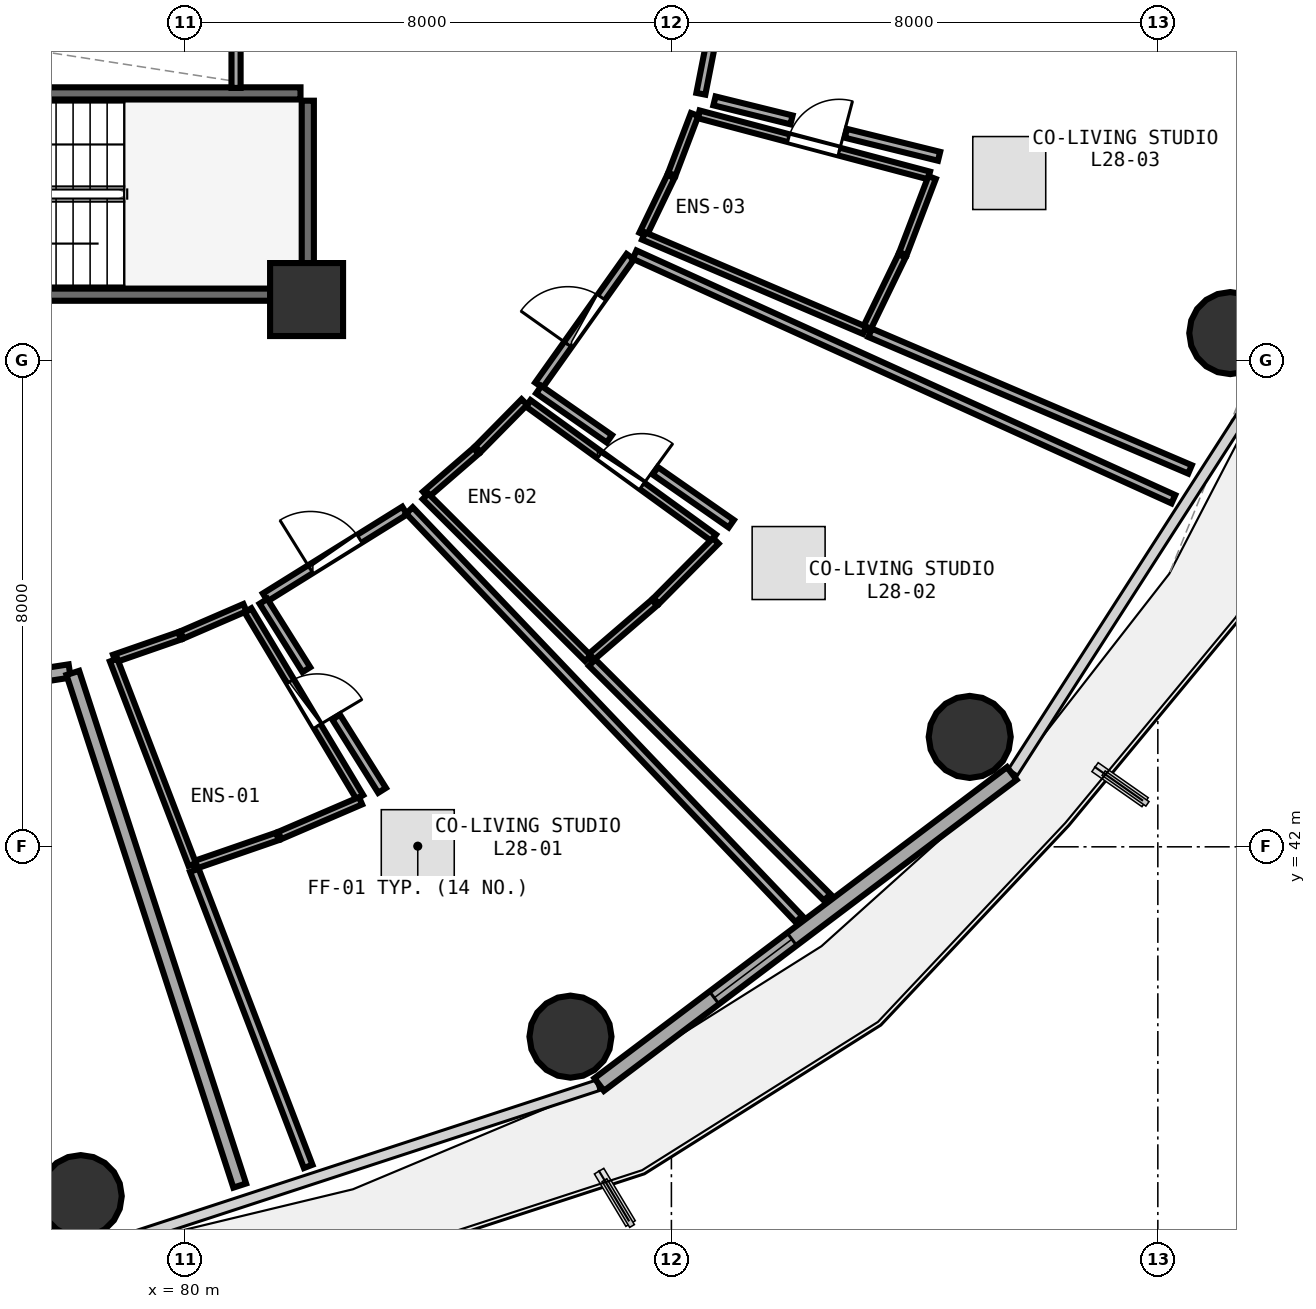
"""IFC4 building model, lengths in metres.
Left out: names, types, materials, properties, quantities, classifications, styles, units other than length and angle.
Written with IfcOpenShell. Run it as: python <this file> out.ifc"""

import sys

from ifc_helpers import new_model, si_unit, direction, frame, frame_2d, origin, origin_2d, place, context, subcontext, project, spatial, rectangle, circle, extrude, element, fill, save


model = new_model("IFC4")
c1 = context("Model", 3, precision=1e-05, world=origin(), true_north=direction((0.0, 1.0)))
c2 = subcontext(c1, "Body", "Model", "MODEL_VIEW")
j1 = project(units=[si_unit("LENGTHUNIT", "METRE"), si_unit("PLANEANGLEUNIT", "RADIAN")], contexts=[c1])
p1 = place(None, origin())
s1 = spatial("IfcSite", under=j1, at=p1, CompositionType="ELEMENT")
p2 = place(p1, origin())
s2 = spatial("IfcBuilding", under=s1, at=p2, CompositionType="ELEMENT")
p3 = place(p2, frame((0.0, 0.0, 110.1)))
s3 = spatial("IfcBuildingStorey", under=s2, at=p3, CompositionType="ELEMENT", Elevation=110.1)
p4 = place(p3, frame((82.0, 51.0, 0.0), z_axis=(0.0, 0.0, 1.0), x_axis=(1.0, 0.0, 0.0)))
e1 = element("IfcColumn", 1, at=p4, inside=s3, PredefinedType="PILASTER", context=c2, shape_type="SweptSolid", body=[
    extrude(rectangle(XDim=1.2, YDim=1.2, at=origin_2d()), origin(), (0.0, 0.0, 1.0), 3.75),
])
for number, where, z_axis, x_axis in (
    (2, (78.286, 36.255, 0.0), (0.0, 0.0, 1.0), (1.0, 0.0, 0.0)),
    (3, (86.34, 38.878, 0.0), (0.0, 0.0, 1.0), (1.0, 0.0, 0.0)),
    (4, (92.906, 43.807, 0.0), (0.0, 0.0, 1.0), (1.0, 0.0, 0.0)),
    (5, (97.192, 50.448, 0.0), (0.0, 0.0, 1.0), (1.0, 0.0, 0.0)),
):
    element("IfcColumn", number, at=place(p3, frame(where, z_axis=z_axis, x_axis=x_axis)), inside=s3, PredefinedType="COLUMN", context=c2, shape_type="SweptSolid", body=[
        extrude(circle(Radius=0.675, at=origin_2d()), origin(), (0.0, 0.0, 1.0), 3.75),
    ])
p5 = place(p3, frame((86.812, 38.09, 0.0), z_axis=(0.0, 0.0, 1.0), x_axis=(0.798501507879, 0.601992808857, 0.0)))
e6 = element("IfcWall", 6, at=p5, inside=s3, PredefinedType="SOLIDWALL", context=c2, shape_type="SweptSolid", body=[
    extrude(rectangle(XDim=8.499, YDim=0.26, at=frame_2d((4.25, 0.0))), origin(), (0.0, 0.0, 1.0), 3.475),
])
p6 = place(p5, frame((2.37, 0.0, 0.85)))
e7 = element("IfcOpeningElement", 7, at=p6, cuts=e6, PredefinedType="OPENING", context=c2, shape_type="SweptSolid", body=[
    extrude(rectangle(XDim=1.6, YDim=1.45, at=frame_2d((0.8, 0.725))), frame((0.0, 0.14, 0.0), z_axis=(0.0, -1.0, 0.0), x_axis=(1.0, 0.0, 0.0)), (0.0, 0.0, 1.0), 0.28),
])
p7 = place(p3, frame((74.0, 51.08, 0.0), z_axis=(0.0, 0.0, 1.0), x_axis=(1.0, 0.0, 0.0)))
e8 = element("IfcWall", 8, at=p7, inside=s3, PredefinedType="SHEAR", context=c2, shape_type="SweptSolid", body=[
    extrude(rectangle(XDim=7.9, YDim=0.2, at=frame_2d((3.95, 0.0))), origin(), (0.0, 0.0, 1.0), 3.49),
])
p8 = place(p7, frame((1.12, 0.0, 0.0)))
e9 = element("IfcOpeningElement", 9, at=p8, cuts=e8, PredefinedType="OPENING", context=c2, shape_type="SweptSolid", body=[
    extrude(rectangle(XDim=1.05, YDim=2.1, at=frame_2d((0.525, 1.05))), frame((0.0, 0.11, 0.0), z_axis=(0.0, -1.0, 0.0), x_axis=(1.0, 0.0, 0.0)), (0.0, 0.0, 1.0), 0.22),
])
p9 = place(p3, frame((82.02, 51.2, 0.0), z_axis=(0.0, 0.0, 1.0), x_axis=(0.0, 1.0, 0.0)))
e10 = element("IfcWall", 10, at=p9, inside=s3, PredefinedType="SHEAR", context=c2, shape_type="SweptSolid", body=[
    extrude(rectangle(XDim=3.07, YDim=0.2, at=frame_2d((1.535, 0.0))), origin(), (0.0, 0.0, 1.0), 3.49),
])
p10 = place(p3, frame((81.9, 54.39, 0.0), z_axis=(0.0, 0.0, 1.0), x_axis=(-1.0, 0.0, 0.0)))
e11 = element("IfcWall", 11, at=p10, inside=s3, PredefinedType="SHEAR", context=c2, shape_type="SweptSolid", body=[
    extrude(rectangle(XDim=8.46, YDim=0.2, at=frame_2d((4.23, 0.0))), origin(), (0.0, 0.0, 1.0), 3.49),
])
p11 = place(p3, frame((80.84, 54.48, 0.0), z_axis=(0.0, 0.0, 1.0), x_axis=(0.0, 1.0, 0.0)))
e12 = element("IfcWall", 12, at=p11, inside=s3, PredefinedType="PARTITIONING", context=c2, shape_type="SweptSolid", body=[
    extrude(rectangle(XDim=2.29, YDim=0.15, at=frame_2d((1.145, 0.0))), origin(), (0.0, 0.0, 1.0), 3.48),
])
p12 = place(p3, frame((81.036, 45.889, 0.0), z_axis=(0.0, 0.0, 1.0), x_axis=(0.513583206277, -0.858039795249, 0.0)))
e13 = element("IfcWall", 13, at=p12, inside=s3, PredefinedType="PLUMBINGWALL", context=c2, shape_type="SweptSolid", body=[
    extrude(rectangle(XDim=3.581, YDim=0.13, at=frame_2d((1.791, 0.0))), origin(), (0.0, 0.0, 1.0), 3.175),
])
p13 = place(p12, frame((1.361, 0.0, 0.0)))
e14 = element("IfcOpeningElement", 14, at=p13, cuts=e13, PredefinedType="OPENING", context=c2, shape_type="SweptSolid", body=[
    extrude(rectangle(XDim=0.86, YDim=2.05, at=frame_2d((0.43, 1.025))), frame((0.0, 0.075, 0.0), z_axis=(0.0, -1.0, 0.0), x_axis=(1.0, 0.0, 0.0)), (0.0, 0.0, 1.0), 0.15),
])
p14 = place(p3, frame((81.321, 46.103, 0.0), z_axis=(0.0, 0.0, 1.0), x_axis=(0.849017842519, 0.528364176572, 0.0)))
e15 = element("IfcWall", 15, at=p14, inside=s3, PredefinedType="PARTITIONING", context=c2, shape_type="SweptSolid", body=[
    extrude(rectangle(XDim=2.7, YDim=0.15, at=frame_2d((1.35, 0.0))), origin(), (0.0, 0.0, 1.0), 2.925),
])
p15 = place(p14, frame((0.875, 0.0, 0.0)))
e16 = element("IfcOpeningElement", 16, at=p15, cuts=e15, PredefinedType="OPENING", context=c2, shape_type="SweptSolid", body=[
    extrude(rectangle(XDim=0.95, YDim=2.08, at=frame_2d((0.475, 1.04))), frame((0.0, 0.085, 0.0), z_axis=(0.0, -1.0, 0.0), x_axis=(1.0, 0.0, 0.0)), (0.0, 0.0, 1.0), 0.17),
])
p16 = place(p3, frame((85.645, 49.294, 0.0), z_axis=(0.0, 0.0, 1.0), x_axis=(0.809536550173, -0.587069479647, 0.0)))
e17 = element("IfcWall", 17, at=p16, inside=s3, PredefinedType="PLUMBINGWALL", context=c2, shape_type="SweptSolid", body=[
    extrude(rectangle(XDim=3.769, YDim=0.13, at=frame_2d((1.884, 0.0))), origin(), (0.0, 0.0, 1.0), 3.175),
])
p17 = place(p16, frame((1.454, 0.0, 0.0)))
e18 = element("IfcOpeningElement", 18, at=p17, cuts=e17, PredefinedType="OPENING", context=c2, shape_type="SweptSolid", body=[
    extrude(rectangle(XDim=0.86, YDim=2.05, at=frame_2d((0.43, 1.025))), frame((0.0, 0.075, 0.0), z_axis=(0.0, -1.0, 0.0), x_axis=(1.0, 0.0, 0.0)), (0.0, 0.0, 1.0), 0.15),
])
p18 = place(p3, frame((85.821, 49.591, 0.0), z_axis=(0.0, 0.0, 1.0), x_axis=(0.579332158596, 0.815091559284, 0.0)))
e19 = element("IfcWall", 19, at=p18, inside=s3, PredefinedType="PARTITIONING", context=c2, shape_type="SweptSolid", body=[
    extrude(rectangle(XDim=2.595, YDim=0.15, at=frame_2d((1.297, 0.0))), origin(), (0.0, 0.0, 1.0), 2.925),
])
p19 = place(p18, frame((0.823, 0.0, 0.0)))
e20 = element("IfcOpeningElement", 20, at=p19, cuts=e19, PredefinedType="OPENING", context=c2, shape_type="SweptSolid", body=[
    extrude(rectangle(XDim=0.95, YDim=2.08, at=frame_2d((0.475, 1.04))), frame((0.0, 0.085, 0.0), z_axis=(0.0, -1.0, 0.0), x_axis=(1.0, 0.0, 0.0)), (0.0, 0.0, 1.0), 0.17),
])
p20 = place(p3, frame((88.447, 54.047, 0.0), z_axis=(0.0, 0.0, 1.0), x_axis=(0.966509259567, -0.25663174233, 0.0)))
e21 = element("IfcWall", 21, at=p20, inside=s3, PredefinedType="PLUMBINGWALL", context=c2, shape_type="SweptSolid", body=[
    extrude(rectangle(XDim=3.921, YDim=0.13, at=frame_2d((1.961, 0.0))), origin(), (0.0, 0.0, 1.0), 3.175),
])
p21 = place(p20, frame((1.531, 0.0, 0.0)))
e22 = element("IfcOpeningElement", 22, at=p21, cuts=e21, PredefinedType="OPENING", context=c2, shape_type="SweptSolid", body=[
    extrude(rectangle(XDim=0.86, YDim=2.05, at=frame_2d((0.43, 1.025))), frame((0.0, 0.075, 0.0), z_axis=(0.0, -1.0, 0.0), x_axis=(1.0, 0.0, 0.0)), (0.0, 0.0, 1.0), 0.15),
])
p22 = place(p3, frame((88.485, 54.384, 0.0), z_axis=(0.0, 0.0, 1.0), x_axis=(0.192670392626, 0.981263532292, 0.0)))
e23 = element("IfcWall", 23, at=p22, inside=s3, PredefinedType="PARTITIONING", context=c2, shape_type="SweptSolid", body=[
    extrude(rectangle(XDim=2.522, YDim=0.15, at=frame_2d((1.261, 0.0))), origin(), (0.0, 0.0, 1.0), 3.48),
])
p23 = place(p22, frame((0.786, 0.0, 0.0)))
e24 = element("IfcOpeningElement", 24, at=p23, cuts=e23, PredefinedType="OPENING", context=c2, shape_type="SweptSolid", body=[
    extrude(rectangle(XDim=0.95, YDim=2.08, at=frame_2d((0.475, 1.04))), frame((0.0, 0.085, 0.0), z_axis=(0.0, -1.0, 0.0), x_axis=(1.0, 0.0, 0.0)), (0.0, 0.0, 1.0), 0.17),
])
p24 = place(p3, frame((74.914, 44.399, 0.0), z_axis=(0.0, 0.0, 1.0), x_axis=(0.988282336333, 0.152636901479, 0.0)))
e25 = element("IfcWall", 25, at=p24, inside=s3, PredefinedType="SOLIDWALL", context=c2, shape_type="SweptSolid", body=[
    extrude(rectangle(XDim=3.228, YDim=0.22, at=frame_2d((1.614, 0.0))), origin(), (0.0, 0.0, 1.0), 3.48),
])
p25 = place(p3, frame((78.156, 44.86, 0.0), z_axis=(0.0, 0.0, 1.0), x_axis=(0.309595310809, -0.950868415463, 0.0)))
e26 = element("IfcWall", 26, at=p25, inside=s3, PredefinedType="SOLIDWALL", context=c2, shape_type="SweptSolid", body=[
    extrude(rectangle(XDim=8.867, YDim=0.22, at=frame_2d((4.433, 0.0))), origin(), (0.0, 0.0, 1.0), 2.925),
])
p26 = place(p3, frame((78.838, 45.097, 0.0), z_axis=(0.0, 0.0, 1.0), x_axis=(0.94463296612, 0.328128876084, 0.0)))
e27 = element("IfcWall", 27, at=p26, inside=s3, PredefinedType="PLUMBINGWALL", context=c2, shape_type="SweptSolid", body=[
    extrude(rectangle(XDim=1.136, YDim=0.13, at=frame_2d((0.568, 0.0))), origin(), (0.0, 0.0, 1.0), 3.235),
])
p27 = place(p3, frame((79.948, 45.484, 0.0), z_axis=(0.0, 0.0, 1.0), x_axis=(0.917754995973, 0.397147034946, 0.0)))
e28 = element("IfcWall", 28, at=p27, inside=s3, PredefinedType="PLUMBINGWALL", context=c2, shape_type="SweptSolid", body=[
    extrude(rectangle(XDim=1.131, YDim=0.13, at=frame_2d((0.565, 0.0))), origin(), (0.0, 0.0, 1.0), 2.925),
])
p28 = place(p3, frame((82.888, 42.757, 0.0), z_axis=(0.0, 0.0, 1.0), x_axis=(-0.918751832311, -0.394835498183, 0.0)))
e29 = element("IfcWall", 29, at=p28, inside=s3, PredefinedType="PLUMBINGWALL", context=c2, shape_type="SweptSolid", body=[
    extrude(rectangle(XDim=1.447, YDim=0.13, at=frame_2d((0.724, 0.0))), origin(), (0.0, 0.0, 1.0), 3.48),
])
p29 = place(p3, frame((81.521, 42.171, 0.0), z_axis=(0.0, 0.0, 1.0), x_axis=(-0.94522127907, -0.326430289025, 0.0)))
e30 = element("IfcWall", 30, at=p29, inside=s3, PredefinedType="PLUMBINGWALL", context=c2, shape_type="SweptSolid", body=[
    extrude(rectangle(XDim=1.455, YDim=0.13, at=frame_2d((0.727, 0.0))), origin(), (0.0, 0.0, 1.0), 3.48),
])
p30 = place(p3, frame((80.12, 41.709, 0.0), z_axis=(0.0, 0.0, 1.0), x_axis=(-0.359078976073, 0.933307178233, 0.0)))
e31 = element("IfcWall", 31, at=p30, inside=s3, PredefinedType="PLUMBINGWALL", context=c2, shape_type="SweptSolid", body=[
    extrude(rectangle(XDim=3.603, YDim=0.13, at=frame_2d((1.801, 0.0))), origin(), (0.0, 0.0, 1.0), 2.925),
])
p31 = place(p3, frame((83.692, 47.532, 0.0), z_axis=(0.0, 0.0, 1.0), x_axis=(0.690037215828, -0.723773887877, 0.0)))
e32 = element("IfcWall", 32, at=p31, inside=s3, PredefinedType="PARTITIONING", context=c2, shape_type="SweptSolid", body=[
    extrude(rectangle(XDim=9.285, YDim=0.15, at=frame_2d((4.642, 0.0))), origin(), (0.0, 0.0, 1.0), 2.975),
])
p32 = place(p3, frame((82.027, 36.744, 0.0), z_axis=(0.0, 0.0, 1.0), x_axis=(-0.358828576498, 0.933403477971, 0.0)))
e33 = element("IfcWall", 33, at=p32, inside=s3, PredefinedType="PARTITIONING", context=c2, shape_type="SweptSolid", body=[
    extrude(rectangle(XDim=5.218, YDim=0.15, at=frame_2d((2.609, 0.0))), origin(), (0.0, 0.0, 1.0), 2.975),
])
p33 = place(p3, frame((83.242, 42.928, 0.0), z_axis=(0.0, 0.0, 1.0), x_axis=(-0.531370409895, 0.847139591501, 0.0)))
e34 = element("IfcWall", 34, at=p33, inside=s3, PredefinedType="PARTITIONING", context=c2, shape_type="SweptSolid", body=[
    extrude(rectangle(XDim=1.423, YDim=0.15, at=frame_2d((0.712, 0.0))), origin(), (0.0, 0.0, 1.0), 3.175),
])
p34 = place(p3, frame((81.996, 44.913, 0.0), z_axis=(0.0, 0.0, 1.0), x_axis=(-0.53138752038, 0.847128858666, 0.0)))
e35 = element("IfcWall", 35, at=p34, inside=s3, PredefinedType="PARTITIONING", context=c2, shape_type="SweptSolid", body=[
    extrude(rectangle(XDim=1.327, YDim=0.15, at=frame_2d((0.664, 0.0))), origin(), (0.0, 0.0, 1.0), 3.235),
])
p35 = place(p3, frame((83.957, 47.791, 0.0), z_axis=(0.0, 0.0, 1.0), x_axis=(0.755718391314, 0.654896719361, 0.0)))
e36 = element("IfcWall", 36, at=p35, inside=s3, PredefinedType="PLUMBINGWALL", context=c2, shape_type="SweptSolid", body=[
    extrude(rectangle(XDim=1.099, YDim=0.13, at=frame_2d((0.55, 0.0))), origin(), (0.0, 0.0, 1.0), 3.48),
])
p36 = place(p3, frame((84.817, 48.538, 0.0), z_axis=(0.0, 0.0, 1.0), x_axis=(0.701824632831, 0.712349762934, 0.0)))
e37 = element("IfcWall", 37, at=p36, inside=s3, PredefinedType="PLUMBINGWALL", context=c2, shape_type="SweptSolid", body=[
    extrude(rectangle(XDim=1.09, YDim=0.13, at=frame_2d((0.545, 0.0))), origin(), (0.0, 0.0, 1.0), 2.925),
])
p37 = place(p3, frame((88.73, 47.032, 0.0), z_axis=(0.0, 0.0, 1.0), x_axis=(-0.704030727822, -0.71016951095, 0.0)))
e38 = element("IfcWall", 38, at=p37, inside=s3, PredefinedType="PLUMBINGWALL", context=c2, shape_type="SweptSolid", body=[
    extrude(rectangle(XDim=1.392, YDim=0.13, at=frame_2d((0.696, 0.0))), origin(), (0.0, 0.0, 1.0), 2.925),
])
p38 = place(p3, frame((87.721, 46.016, 0.0), z_axis=(0.0, 0.0, 1.0), x_axis=(-0.757978890822, -0.652279082194, 0.0)))
e39 = element("IfcWall", 39, at=p38, inside=s3, PredefinedType="PLUMBINGWALL", context=c2, shape_type="SweptSolid", body=[
    extrude(rectangle(XDim=1.404, YDim=0.13, at=frame_2d((0.702, 0.0))), origin(), (0.0, 0.0, 1.0), 3.175),
])
p39 = place(p3, frame((86.627, 45.101, 0.0), z_axis=(0.0, 0.0, 1.0), x_axis=(-0.708109515667, 0.706102622727, 0.0)))
e40 = element("IfcWall", 40, at=p39, inside=s3, PredefinedType="PLUMBINGWALL", context=c2, shape_type="SweptSolid", body=[
    extrude(rectangle(XDim=3.771, YDim=0.13, at=frame_2d((1.886, 0.0))), origin(), (0.0, 0.0, 1.0), 3.175),
])
p40 = place(p3, frame((87.396, 51.739, 0.0), z_axis=(0.0, 0.0, 1.0), x_axis=(0.910573449225, -0.413347303809, 0.0)))
e41 = element("IfcWall", 41, at=p40, inside=s3, PredefinedType="PARTITIONING", context=c2, shape_type="SweptSolid", body=[
    extrude(rectangle(XDim=9.73, YDim=0.15, at=frame_2d((4.865, 0.0))), origin(), (0.0, 0.0, 1.0), 2.925),
])
p41 = place(p3, frame((90.562, 41.169, 0.0), z_axis=(0.0, 0.0, 1.0), x_axis=(-0.707642907914, 0.706570247661, 0.0)))
e42 = element("IfcWall", 42, at=p41, inside=s3, PredefinedType="PARTITIONING", context=c2, shape_type="SweptSolid", body=[
    extrude(rectangle(XDim=5.462, YDim=0.15, at=frame_2d((2.731, 0.0))), origin(), (0.0, 0.0, 1.0), 2.975),
])
p42 = place(p3, frame((88.984, 47.313, 0.0), z_axis=(0.0, 0.0, 1.0), x_axis=(-0.820375371548, 0.571825366486, 0.0)))
e43 = element("IfcWall", 43, at=p42, inside=s3, PredefinedType="PARTITIONING", context=c2, shape_type="SweptSolid", body=[
    extrude(rectangle(XDim=1.522, YDim=0.15, at=frame_2d((0.761, 0.0))), origin(), (0.0, 0.0, 1.0), 3.175),
])
p43 = place(p3, frame((86.98, 48.71, 0.0), z_axis=(0.0, 0.0, 1.0), x_axis=(-0.820381002298, 0.571817288187, 0.0)))
e44 = element("IfcWall", 44, at=p43, inside=s3, PredefinedType="PARTITIONING", context=c2, shape_type="SweptSolid", body=[
    extrude(rectangle(XDim=1.415, YDim=0.15, at=frame_2d((0.708, 0.0))), origin(), (0.0, 0.0, 1.0), 3.235),
])
p44 = place(p3, frame((87.533, 52.071, 0.0), z_axis=(0.0, 0.0, 1.0), x_axis=(0.433586527714, 0.90111193699, 0.0)))
e45 = element("IfcWall", 45, at=p44, inside=s3, PredefinedType="PLUMBINGWALL", context=c2, shape_type="SweptSolid", body=[
    extrude(rectangle(XDim=1.057, YDim=0.13, at=frame_2d((0.529, 0.0))), origin(), (0.0, 0.0, 1.0), 3.235),
])
p45 = place(p3, frame((88.007, 53.061, 0.0), z_axis=(0.0, 0.0, 1.0), x_axis=(0.356410474394, 0.934329478151, 0.0)))
e46 = element("IfcWall", 46, at=p45, inside=s3, PredefinedType="PLUMBINGWALL", context=c2, shape_type="SweptSolid", body=[
    extrude(rectangle(XDim=1.052, YDim=0.13, at=frame_2d((0.526, 0.0))), origin(), (0.0, 0.0, 1.0), 3.235),
])
p46 = place(p3, frame((92.288, 53.006, 0.0), z_axis=(0.0, 0.0, 1.0), x_axis=(-0.357880433235, -0.933767420457, 0.0)))
e47 = element("IfcWall", 47, at=p46, inside=s3, PredefinedType="PLUMBINGWALL", context=c2, shape_type="SweptSolid", body=[
    extrude(rectangle(XDim=1.341, YDim=0.13, at=frame_2d((0.67, 0.0))), origin(), (0.0, 0.0, 1.0), 3.48),
])
p47 = place(p3, frame((91.792, 51.718, 0.0), z_axis=(0.0, 0.0, 1.0), x_axis=(-0.436251309033, -0.899824869275, 0.0)))
e48 = element("IfcWall", 48, at=p47, inside=s3, PredefinedType="PLUMBINGWALL", context=c2, shape_type="SweptSolid", body=[
    extrude(rectangle(XDim=1.349, YDim=0.13, at=frame_2d((0.675, 0.0))), origin(), (0.0, 0.0, 1.0), 2.925),
])
p48 = place(p3, frame((91.177, 50.494, 0.0), z_axis=(0.0, 0.0, 1.0), x_axis=(-0.919709759256, 0.392598979531, 0.0)))
e49 = element("IfcWall", 49, at=p48, inside=s3, PredefinedType="PLUMBINGWALL", context=c2, shape_type="SweptSolid", body=[
    extrude(rectangle(XDim=3.951, YDim=0.13, at=frame_2d((1.976, 0.0))), origin(), (0.0, 0.0, 1.0), 2.925),
])
p49 = place(p3, frame((96.529, 48.207, 0.0), z_axis=(0.0, 0.0, 1.0), x_axis=(-0.919671747219, 0.392688015308, 0.0)))
e50 = element("IfcWall", 50, at=p49, inside=s3, PredefinedType="PARTITIONING", context=c2, shape_type="SweptSolid", body=[
    extrude(rectangle(XDim=5.721, YDim=0.15, at=frame_2d((2.86, 0.0))), origin(), (0.0, 0.0, 1.0), 2.925),
])
p50 = place(p3, frame((92.402, 53.356, 0.0), z_axis=(0.0, 0.0, 1.0), x_axis=(-0.97090160449, 0.23947875563, 0.0)))
e51 = element("IfcWall", 51, at=p50, inside=s3, PredefinedType="PARTITIONING", context=c2, shape_type="SweptSolid", body=[
    extrude(rectangle(XDim=1.579, YDim=0.15, at=frame_2d((0.79, 0.0))), origin(), (0.0, 0.0, 1.0), 3.175),
])
p51 = place(p3, frame((89.976, 53.954, 0.0), z_axis=(0.0, 0.0, 1.0), x_axis=(-0.97090790697, 0.23945320249, 0.0)))
e52 = element("IfcWall", 52, at=p51, inside=s3, PredefinedType="PARTITIONING", context=c2, shape_type="SweptSolid", body=[
    extrude(rectangle(XDim=1.305, YDim=0.15, at=frame_2d((0.653, 0.0))), origin(), (0.0, 0.0, 1.0), 3.48),
])
p52 = place(p6, origin())
e53 = element("IfcWindow", 53, at=p52, inside=s3, PartitioningType="SINGLE_PANEL", PredefinedType="WINDOW", context=c2, shape_type="SweptSolid", body=[
    extrude(rectangle(XDim=1.6, YDim=1.45, at=frame_2d((0.8, 0.725))), frame((0.0, 0.03, 0.0), z_axis=(0.0, -1.0, 0.0), x_axis=(1.0, 0.0, 0.0)), (0.0, 0.0, 1.0), 0.06),
])
fill(e7, e53)
p53 = place(p13, origin())
e54 = element("IfcDoor", 54, at=p53, inside=s3, OperationType="SINGLE_SWING_RIGHT", PredefinedType="DOOR", context=c2, shape_type="SweptSolid", body=[
    extrude(rectangle(XDim=0.86, YDim=2.05, at=frame_2d((0.43, 1.025))), frame((0.0, 0.025, 0.0), z_axis=(0.0, -1.0, 0.0), x_axis=(1.0, 0.0, 0.0)), (0.0, 0.0, 1.0), 0.05),
])
fill(e14, e54)
p54 = place(p15, origin())
e55 = element("IfcDoor", 55, at=p54, inside=s3, OperationType="SINGLE_SWING_LEFT", PredefinedType="DOOR", context=c2, shape_type="SweptSolid", body=[
    extrude(rectangle(XDim=0.95, YDim=2.08, at=frame_2d((0.475, 1.04))), frame((0.0, 0.025, 0.0), z_axis=(0.0, -1.0, 0.0), x_axis=(1.0, 0.0, 0.0)), (0.0, 0.0, 1.0), 0.05),
])
fill(e16, e55)
p55 = place(p17, origin())
e56 = element("IfcDoor", 56, at=p55, inside=s3, OperationType="SINGLE_SWING_RIGHT", PredefinedType="DOOR", context=c2, shape_type="SweptSolid", body=[
    extrude(rectangle(XDim=0.86, YDim=2.05, at=frame_2d((0.43, 1.025))), frame((0.0, 0.025, 0.0), z_axis=(0.0, -1.0, 0.0), x_axis=(1.0, 0.0, 0.0)), (0.0, 0.0, 1.0), 0.05),
])
fill(e18, e56)
p56 = place(p19, origin())
e57 = element("IfcDoor", 57, at=p56, inside=s3, OperationType="SINGLE_SWING_LEFT", PredefinedType="DOOR", context=c2, shape_type="SweptSolid", body=[
    extrude(rectangle(XDim=0.95, YDim=2.08, at=frame_2d((0.475, 1.04))), frame((0.0, 0.025, 0.0), z_axis=(0.0, -1.0, 0.0), x_axis=(1.0, 0.0, 0.0)), (0.0, 0.0, 1.0), 0.05),
])
fill(e20, e57)
p57 = place(p21, origin())
e58 = element("IfcDoor", 58, at=p57, inside=s3, OperationType="SINGLE_SWING_RIGHT", PredefinedType="DOOR", context=c2, shape_type="SweptSolid", body=[
    extrude(rectangle(XDim=0.86, YDim=2.05, at=frame_2d((0.43, 1.025))), frame((0.0, 0.025, 0.0), z_axis=(0.0, -1.0, 0.0), x_axis=(1.0, 0.0, 0.0)), (0.0, 0.0, 1.0), 0.05),
])
fill(e22, e58)
save(model, sys.argv[1])
